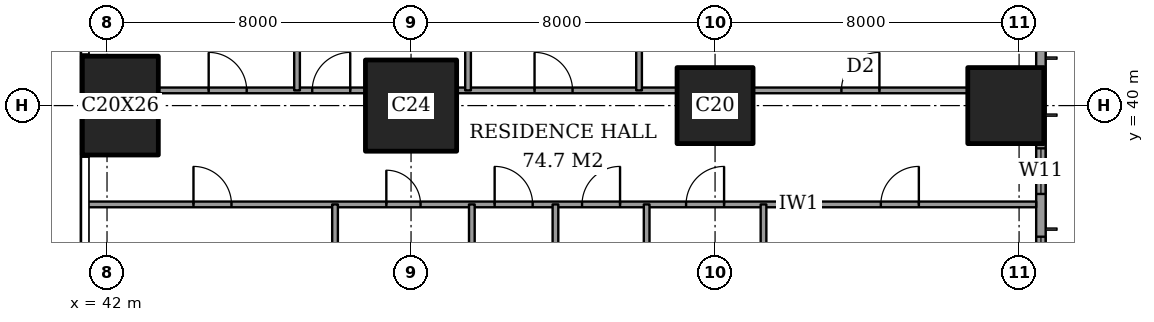
"""IFC4 building model, lengths in metres.
Left out: names, types, materials, properties, quantities, classifications, styles, units other than length and angle.
Written with IfcOpenShell. Run it as: python <this file> out.ifc"""

import sys

from ifc_helpers import new_model, si_unit, direction, frame, frame_2d, origin, origin_2d, place, context, subcontext, project, spatial, rectangle, extrude, element, fill, save


model = new_model("IFC4")
c1 = context("Model", 3, precision=1e-05, world=origin(), true_north=direction((0.0, 1.0)))
c2 = subcontext(c1, "Body", "Model", "MODEL_VIEW")
j1 = project(units=[si_unit("LENGTHUNIT", "METRE"), si_unit("PLANEANGLEUNIT", "RADIAN")], contexts=[c1])
p1 = place(None, origin())
s1 = spatial("IfcSite", under=j1, at=p1, CompositionType="ELEMENT")
p2 = place(p1, origin())
s2 = spatial("IfcBuilding", under=s1, at=p2, CompositionType="ELEMENT")
p3 = place(p2, frame((0.0, 0.0, 125.0)))
s3 = spatial("IfcBuildingStorey", under=s2, at=p3, CompositionType="ELEMENT", Elevation=125.0)
p4 = place(p3, frame((42.35, 40.0, 0.0), z_axis=(0.0, 0.0, 1.0), x_axis=(1.0, 0.0, 0.0)))
e1 = element("IfcColumn", 1, at=p4, inside=s3, PredefinedType="COLUMN", context=c2, shape_type="SweptSolid", body=[
    extrude(rectangle(XDim=2.0, YDim=2.6, at=origin_2d()), origin(), (0.0, 0.0, 1.0), 3.6),
])
p5 = place(p3, frame((50.0, 40.0, 0.0), z_axis=(0.0, 0.0, 1.0), x_axis=(1.0, 0.0, 0.0)))
e2 = element("IfcColumn", 2, at=p5, inside=s3, PredefinedType="COLUMN", context=c2, shape_type="SweptSolid", body=[
    extrude(rectangle(XDim=2.4, YDim=2.4, at=origin_2d()), origin(), (0.0, 0.0, 1.0), 3.6),
])
for number, where, z_axis, x_axis in (
    (3, (58.0, 40.0, 0.0), (0.0, 0.0, 1.0), (1.0, 0.0, 0.0)),
    (4, (65.65, 40.0, 0.0), (0.0, 0.0, 1.0), (1.0, 0.0, 0.0)),
):
    element("IfcColumn", number, at=place(p3, frame(where, z_axis=z_axis, x_axis=x_axis)), inside=s3, PredefinedType="COLUMN", context=c2, shape_type="SweptSolid", body=[
        extrude(rectangle(XDim=2.0, YDim=2.0, at=origin_2d()), origin(), (0.0, 0.0, 1.0), 3.6),
    ])
p6 = place(p3, frame((66.575, 3.175, 0.0), z_axis=(0.0, 0.0, 1.0), x_axis=(0.0, 1.0, 0.0)))
e5 = element("IfcWall", 5, at=p6, inside=s3, PredefinedType="SOLIDWALL", context=c2, shape_type="SweptSolid", body=[
    extrude(rectangle(XDim=41.65, YDim=0.25, at=frame_2d((20.825, 0.0))), origin(), (0.0, 0.0, 1.0), 3.6),
])
p7 = place(p6, frame((0.775, 0.0, 0.4)))
e6 = element("IfcOpeningElement", 6, at=p7, cuts=e5, PredefinedType="OPENING", context=c2, shape_type="SweptSolid", body=[
    extrude(rectangle(XDim=2.4, YDim=2.2, at=frame_2d((1.2, 1.1))), frame((0.0, 0.135, 0.0), z_axis=(0.0, -1.0, 0.0), x_axis=(1.0, 0.0, 0.0)), (0.0, 0.0, 1.0), 0.27),
])
p8 = place(p6, frame((6.125, 0.0, 0.4)))
e7 = element("IfcOpeningElement", 7, at=p8, cuts=e5, PredefinedType="OPENING", context=c2, shape_type="SweptSolid", body=[
    extrude(rectangle(XDim=1.2, YDim=2.2, at=frame_2d((0.6, 1.1))), frame((0.0, 0.135, 0.0), z_axis=(0.0, -1.0, 0.0), x_axis=(1.0, 0.0, 0.0)), (0.0, 0.0, 1.0), 0.27),
])
p9 = place(p6, frame((8.375, 0.0, 0.4)))
e8 = element("IfcOpeningElement", 8, at=p9, cuts=e5, PredefinedType="OPENING", context=c2, shape_type="SweptSolid", body=[
    extrude(rectangle(XDim=2.4, YDim=2.2, at=frame_2d((1.2, 1.1))), frame((0.0, 0.135, 0.0), z_axis=(0.0, -1.0, 0.0), x_axis=(1.0, 0.0, 0.0)), (0.0, 0.0, 1.0), 0.27),
])
p10 = place(p6, frame((15.775, 0.0, 0.4)))
e9 = element("IfcOpeningElement", 9, at=p10, cuts=e5, PredefinedType="OPENING", context=c2, shape_type="SweptSolid", body=[
    extrude(rectangle(XDim=2.4, YDim=2.2, at=frame_2d((1.2, 1.1))), frame((0.0, 0.135, 0.0), z_axis=(0.0, -1.0, 0.0), x_axis=(1.0, 0.0, 0.0)), (0.0, 0.0, 1.0), 0.27),
])
p11 = place(p6, frame((23.475, 0.0, 0.4)))
e10 = element("IfcOpeningElement", 10, at=p11, cuts=e5, PredefinedType="OPENING", context=c2, shape_type="SweptSolid", body=[
    extrude(rectangle(XDim=2.4, YDim=2.2, at=frame_2d((1.2, 1.1))), frame((0.0, 0.135, 0.0), z_axis=(0.0, -1.0, 0.0), x_axis=(1.0, 0.0, 0.0)), (0.0, 0.0, 1.0), 0.27),
])
p12 = place(p6, frame((30.975, 0.0, 0.4)))
e11 = element("IfcOpeningElement", 11, at=p12, cuts=e5, PredefinedType="OPENING", context=c2, shape_type="SweptSolid", body=[
    extrude(rectangle(XDim=2.4, YDim=2.2, at=frame_2d((1.2, 1.1))), frame((0.0, 0.135, 0.0), z_axis=(0.0, -1.0, 0.0), x_axis=(1.0, 0.0, 0.0)), (0.0, 0.0, 1.0), 0.27),
])
p13 = place(p6, frame((34.5, 0.0, 0.4)))
e12 = element("IfcOpeningElement", 12, at=p13, cuts=e5, PredefinedType="OPENING", context=c2, shape_type="SweptSolid", body=[
    extrude(rectangle(XDim=1.2, YDim=2.2, at=frame_2d((0.6, 1.1))), frame((0.0, 0.135, 0.0), z_axis=(0.0, -1.0, 0.0), x_axis=(1.0, 0.0, 0.0)), (0.0, 0.0, 1.0), 0.27),
])
p14 = place(p6, frame((38.475, 0.0, 0.4)))
e13 = element("IfcOpeningElement", 13, at=p14, cuts=e5, PredefinedType="OPENING", context=c2, shape_type="SweptSolid", body=[
    extrude(rectangle(XDim=2.4, YDim=2.2, at=frame_2d((1.2, 1.1))), frame((0.0, 0.135, 0.0), z_axis=(0.0, -1.0, 0.0), x_axis=(1.0, 0.0, 0.0)), (0.0, 0.0, 1.0), 0.27),
])
p15 = place(p3, frame((41.439, 37.4, 0.0), z_axis=(0.0, 0.0, 1.0), x_axis=(1.0, 0.0, 0.0)))
e14 = element("IfcWall", 14, at=p15, inside=s3, PredefinedType="PARTITIONING", context=c2, shape_type="SweptSolid", body=[
    extrude(rectangle(XDim=25.011, YDim=0.15, at=frame_2d((12.505, 0.0))), origin(), (0.0, 0.0, 1.0), 3.35),
])
p16 = place(p15, frame((10.761, 0.0, 0.0)))
e15 = element("IfcOpeningElement", 15, at=p16, cuts=e14, PredefinedType="OPENING", context=c2, shape_type="SweptSolid", body=[
    extrude(rectangle(XDim=1.0, YDim=2.1, at=frame_2d((0.5, 1.05))), frame((0.0, 0.085, 0.0), z_axis=(0.0, -1.0, 0.0), x_axis=(1.0, 0.0, 0.0)), (0.0, 0.0, 1.0), 0.17),
])
p17 = place(p15, frame((20.924, 0.0, 0.0)))
e16 = element("IfcOpeningElement", 16, at=p17, cuts=e14, PredefinedType="OPENING", context=c2, shape_type="SweptSolid", body=[
    extrude(rectangle(XDim=1.0, YDim=2.1, at=frame_2d((0.5, 1.05))), frame((0.0, 0.085, 0.0), z_axis=(0.0, -1.0, 0.0), x_axis=(1.0, 0.0, 0.0)), (0.0, 0.0, 1.0), 0.17),
])
p18 = place(p15, frame((15.799, 0.0, 0.0)))
e17 = element("IfcOpeningElement", 17, at=p18, cuts=e14, PredefinedType="OPENING", context=c2, shape_type="SweptSolid", body=[
    extrude(rectangle(XDim=1.0, YDim=2.1, at=frame_2d((0.5, 1.05))), frame((0.0, 0.085, 0.0), z_axis=(0.0, -1.0, 0.0), x_axis=(1.0, 0.0, 0.0)), (0.0, 0.0, 1.0), 0.17),
])
p19 = place(p15, frame((13.061, 0.0, 0.0)))
e18 = element("IfcOpeningElement", 18, at=p19, cuts=e14, PredefinedType="OPENING", context=c2, shape_type="SweptSolid", body=[
    extrude(rectangle(XDim=1.0, YDim=2.1, at=frame_2d((0.5, 1.05))), frame((0.0, 0.085, 0.0), z_axis=(0.0, -1.0, 0.0), x_axis=(1.0, 0.0, 0.0)), (0.0, 0.0, 1.0), 0.17),
])
p20 = place(p15, frame((7.911, 0.0, 0.0)))
e19 = element("IfcOpeningElement", 19, at=p20, cuts=e14, PredefinedType="OPENING", context=c2, shape_type="SweptSolid", body=[
    extrude(rectangle(XDim=0.9, YDim=2.1, at=frame_2d((0.45, 1.05))), frame((0.0, 0.085, 0.0), z_axis=(0.0, -1.0, 0.0), x_axis=(1.0, 0.0, 0.0)), (0.0, 0.0, 1.0), 0.17),
])
p21 = place(p15, frame((2.836, 0.0, 0.0)))
e20 = element("IfcOpeningElement", 20, at=p21, cuts=e14, PredefinedType="OPENING", context=c2, shape_type="SweptSolid", body=[
    extrude(rectangle(XDim=1.0, YDim=2.1, at=frame_2d((0.5, 1.05))), frame((0.0, 0.085, 0.0), z_axis=(0.0, -1.0, 0.0), x_axis=(1.0, 0.0, 0.0)), (0.0, 0.0, 1.0), 0.17),
])
p22 = place(p3, frame((43.35, 40.4, 0.0), z_axis=(0.0, 0.0, 1.0), x_axis=(1.0, 0.0, 0.0)))
e21 = element("IfcWall", 21, at=p22, inside=s3, PredefinedType="PARTITIONING", context=c2, shape_type="SweptSolid", body=[
    extrude(rectangle(XDim=5.45, YDim=0.15, at=frame_2d((2.725, 0.0))), origin(), (0.0, 0.0, 1.0), 3.35),
])
p23 = place(p22, frame((4.05, 0.0, 0.0)))
e22 = element("IfcOpeningElement", 22, at=p23, cuts=e21, PredefinedType="OPENING", context=c2, shape_type="SweptSolid", body=[
    extrude(rectangle(XDim=1.0, YDim=2.1, at=frame_2d((0.5, 1.05))), frame((0.0, 0.085, 0.0), z_axis=(0.0, -1.0, 0.0), x_axis=(1.0, 0.0, 0.0)), (0.0, 0.0, 1.0), 0.17),
])
p24 = place(p22, frame((1.325, 0.0, 0.0)))
e23 = element("IfcOpeningElement", 23, at=p24, cuts=e21, PredefinedType="OPENING", context=c2, shape_type="SweptSolid", body=[
    extrude(rectangle(XDim=1.0, YDim=2.1, at=frame_2d((0.5, 1.05))), frame((0.0, 0.085, 0.0), z_axis=(0.0, -1.0, 0.0), x_axis=(1.0, 0.0, 0.0)), (0.0, 0.0, 1.0), 0.17),
])
p25 = place(p3, frame((51.2, 40.4, 0.0), z_axis=(0.0, 0.0, 1.0), x_axis=(1.0, 0.0, 0.0)))
e24 = element("IfcWall", 24, at=p25, inside=s3, PredefinedType="PARTITIONING", context=c2, shape_type="SweptSolid", body=[
    extrude(rectangle(XDim=5.8, YDim=0.15, at=frame_2d((2.9, 0.0))), origin(), (0.0, 0.0, 1.0), 3.35),
])
p26 = place(p25, frame((2.05, 0.0, 0.0)))
e25 = element("IfcOpeningElement", 25, at=p26, cuts=e24, PredefinedType="OPENING", context=c2, shape_type="SweptSolid", body=[
    extrude(rectangle(XDim=1.0, YDim=2.1, at=frame_2d((0.5, 1.05))), frame((0.0, 0.085, 0.0), z_axis=(0.0, -1.0, 0.0), x_axis=(1.0, 0.0, 0.0)), (0.0, 0.0, 1.0), 0.17),
])
p27 = place(p3, frame((59.0, 40.4, 0.0), z_axis=(0.0, 0.0, 1.0), x_axis=(1.0, 0.0, 0.0)))
e26 = element("IfcWall", 26, at=p27, inside=s3, PredefinedType="PARTITIONING", context=c2, shape_type="SweptSolid", body=[
    extrude(rectangle(XDim=5.65, YDim=0.15, at=frame_2d((2.825, 0.0))), origin(), (0.0, 0.0, 1.0), 3.35),
])
p28 = place(p27, frame((2.325, 0.0, 0.0)))
e27 = element("IfcOpeningElement", 27, at=p28, cuts=e26, PredefinedType="OPENING", context=c2, shape_type="SweptSolid", body=[
    extrude(rectangle(XDim=1.0, YDim=2.1, at=frame_2d((0.5, 1.05))), frame((0.0, 0.085, 0.0), z_axis=(0.0, -1.0, 0.0), x_axis=(1.0, 0.0, 0.0)), (0.0, 0.0, 1.0), 0.17),
])
p29 = place(p3, frame((47.0, 40.4, 0.0), z_axis=(0.0, 0.0, 1.0), x_axis=(0.0, 1.0, 0.0)))
e28 = element("IfcWall", 28, at=p29, inside=s3, PredefinedType="PARTITIONING", context=c2, shape_type="SweptSolid", body=[
    extrude(rectangle(XDim=8.05, YDim=0.15, at=frame_2d((4.025, 0.0))), origin(), (0.0, 0.0, 1.0), 3.35),
])
p30 = place(p3, frame((48.0, 28.0, 0.0), z_axis=(0.0, 0.0, 1.0), x_axis=(0.0, 1.0, 0.0)))
e29 = element("IfcWall", 29, at=p30, inside=s3, PredefinedType="PARTITIONING", context=c2, shape_type="SweptSolid", body=[
    extrude(rectangle(XDim=9.4, YDim=0.15, at=frame_2d((4.7, 0.0))), origin(), (0.0, 0.0, 1.0), 3.35),
])
p31 = place(p30, frame((0.325, 0.0, 0.0)))
e30 = element("IfcOpeningElement", 30, at=p31, cuts=e29, PredefinedType="OPENING", context=c2, shape_type="SweptSolid", body=[
    extrude(rectangle(XDim=0.9, YDim=2.1, at=frame_2d((0.45, 1.05))), frame((0.0, 0.085, 0.0), z_axis=(0.0, -1.0, 0.0), x_axis=(1.0, 0.0, 0.0)), (0.0, 0.0, 1.0), 0.17),
])
p32 = place(p3, frame((51.5, 40.4, 0.0), z_axis=(0.0, 0.0, 1.0), x_axis=(0.0, 1.0, 0.0)))
e31 = element("IfcWall", 31, at=p32, inside=s3, PredefinedType="PARTITIONING", context=c2, shape_type="SweptSolid", body=[
    extrude(rectangle(XDim=8.05, YDim=0.15, at=frame_2d((4.025, 0.0))), origin(), (0.0, 0.0, 1.0), 3.35),
])
for number, where, z_axis, x_axis in (
    (32, (51.6, 29.55, 0.0), (0.0, 0.0, 1.0), (0.0, 1.0, 0.0)),
    (33, (53.8, 29.55, 0.0), (0.0, 0.0, 1.0), (0.0, 1.0, 0.0)),
):
    element("IfcWall", number, at=place(p3, frame(where, z_axis=z_axis, x_axis=x_axis)), inside=s3, PredefinedType="PARTITIONING", context=c2, shape_type="SweptSolid", body=[
        extrude(rectangle(XDim=7.85, YDim=0.15, at=frame_2d((3.925, 0.0))), origin(), (0.0, 0.0, 1.0), 3.35),
    ])
p33 = place(p3, frame((56.0, 40.4, 0.0), z_axis=(0.0, 0.0, 1.0), x_axis=(0.0, 1.0, 0.0)))
e34 = element("IfcWall", 34, at=p33, inside=s3, PredefinedType="PARTITIONING", context=c2, shape_type="SweptSolid", body=[
    extrude(rectangle(XDim=8.05, YDim=0.15, at=frame_2d((4.025, 0.0))), origin(), (0.0, 0.0, 1.0), 3.35),
])
p34 = place(p3, frame((56.2, 28.0, 0.0), z_axis=(0.0, 0.0, 1.0), x_axis=(0.0, 1.0, 0.0)))
e35 = element("IfcWall", 35, at=p34, inside=s3, PredefinedType="PARTITIONING", context=c2, shape_type="SweptSolid", body=[
    extrude(rectangle(XDim=9.4, YDim=0.15, at=frame_2d((4.7, 0.0))), origin(), (0.0, 0.0, 1.0), 3.35),
])
p35 = place(p34, frame((0.325, 0.0, 0.0)))
e36 = element("IfcOpeningElement", 36, at=p35, cuts=e35, PredefinedType="OPENING", context=c2, shape_type="SweptSolid", body=[
    extrude(rectangle(XDim=0.9, YDim=2.1, at=frame_2d((0.45, 1.05))), frame((0.0, 0.085, 0.0), z_axis=(0.0, -1.0, 0.0), x_axis=(1.0, 0.0, 0.0)), (0.0, 0.0, 1.0), 0.17),
])
p36 = place(p3, frame((59.275, 33.2, 0.0), z_axis=(0.0, 0.0, 1.0), x_axis=(0.0, 1.0, 0.0)))
e37 = element("IfcWall", 37, at=p36, inside=s3, PredefinedType="PARTITIONING", context=c2, shape_type="SweptSolid", body=[
    extrude(rectangle(XDim=4.2, YDim=0.15, at=frame_2d((2.1, 0.0))), origin(), (0.0, 0.0, 1.0), 3.35),
])
p37 = place(p12, origin())
e38 = element("IfcWindow", 38, at=p37, inside=s3, PartitioningType="SINGLE_PANEL", PredefinedType="WINDOW", context=c2, shape_type="SweptSolid", body=[
    extrude(rectangle(XDim=2.4, YDim=2.2, at=frame_2d((1.2, 1.1))), frame((0.0, 0.03, 0.0), z_axis=(0.0, -1.0, 0.0), x_axis=(1.0, 0.0, 0.0)), (0.0, 0.0, 1.0), 0.06),
])
fill(e11, e38)
p38 = place(p13, origin())
e39 = element("IfcWindow", 39, at=p38, inside=s3, PartitioningType="SINGLE_PANEL", PredefinedType="WINDOW", context=c2, shape_type="SweptSolid", body=[
    extrude(rectangle(XDim=1.2, YDim=2.2, at=frame_2d((0.6, 1.1))), frame((0.0, 0.03, 0.0), z_axis=(0.0, -1.0, 0.0), x_axis=(1.0, 0.0, 0.0)), (0.0, 0.0, 1.0), 0.06),
])
fill(e12, e39)
p39 = place(p28, origin())
e40 = element("IfcDoor", 40, at=p39, inside=s3, OperationType="SINGLE_SWING_LEFT", PredefinedType="DOOR", context=c2, shape_type="SweptSolid", body=[
    extrude(rectangle(XDim=1.0, YDim=2.1, at=frame_2d((0.5, 1.05))), frame((0.0, 0.025, 0.0), z_axis=(0.0, -1.0, 0.0), x_axis=(1.0, 0.0, 0.0)), (0.0, 0.0, 1.0), 0.05),
])
fill(e27, e40)
p40 = place(p26, origin())
e41 = element("IfcDoor", 41, at=p40, inside=s3, OperationType="SINGLE_SWING_RIGHT", PredefinedType="DOOR", context=c2, shape_type="SweptSolid", body=[
    extrude(rectangle(XDim=1.0, YDim=2.1, at=frame_2d((0.5, 1.05))), frame((0.0, 0.025, 0.0), z_axis=(0.0, -1.0, 0.0), x_axis=(1.0, 0.0, 0.0)), (0.0, 0.0, 1.0), 0.05),
])
fill(e25, e41)
p41 = place(p23, origin())
e42 = element("IfcDoor", 42, at=p41, inside=s3, OperationType="SINGLE_SWING_LEFT", PredefinedType="DOOR", context=c2, shape_type="SweptSolid", body=[
    extrude(rectangle(XDim=1.0, YDim=2.1, at=frame_2d((0.5, 1.05))), frame((0.0, 0.025, 0.0), z_axis=(0.0, -1.0, 0.0), x_axis=(1.0, 0.0, 0.0)), (0.0, 0.0, 1.0), 0.05),
])
fill(e22, e42)
p42 = place(p24, origin())
e43 = element("IfcDoor", 43, at=p42, inside=s3, OperationType="SINGLE_SWING_RIGHT", PredefinedType="DOOR", context=c2, shape_type="SweptSolid", body=[
    extrude(rectangle(XDim=1.0, YDim=2.1, at=frame_2d((0.5, 1.05))), frame((0.0, 0.025, 0.0), z_axis=(0.0, -1.0, 0.0), x_axis=(1.0, 0.0, 0.0)), (0.0, 0.0, 1.0), 0.05),
])
fill(e23, e43)
p43 = place(p16, origin())
e44 = element("IfcDoor", 44, at=p43, inside=s3, OperationType="SINGLE_SWING_RIGHT", PredefinedType="DOOR", context=c2, shape_type="SweptSolid", body=[
    extrude(rectangle(XDim=1.0, YDim=2.1, at=frame_2d((0.5, 1.05))), frame((0.0, 0.025, 0.0), z_axis=(0.0, -1.0, 0.0), x_axis=(1.0, 0.0, 0.0)), (0.0, 0.0, 1.0), 0.05),
])
fill(e15, e44)
p44 = place(p17, origin())
e45 = element("IfcDoor", 45, at=p44, inside=s3, OperationType="SINGLE_SWING_LEFT", PredefinedType="DOOR", context=c2, shape_type="SweptSolid", body=[
    extrude(rectangle(XDim=1.0, YDim=2.1, at=frame_2d((0.5, 1.05))), frame((0.0, 0.025, 0.0), z_axis=(0.0, -1.0, 0.0), x_axis=(1.0, 0.0, 0.0)), (0.0, 0.0, 1.0), 0.05),
])
fill(e16, e45)
p45 = place(p18, origin())
e46 = element("IfcDoor", 46, at=p45, inside=s3, OperationType="SINGLE_SWING_LEFT", PredefinedType="DOOR", context=c2, shape_type="SweptSolid", body=[
    extrude(rectangle(XDim=1.0, YDim=2.1, at=frame_2d((0.5, 1.05))), frame((0.0, 0.025, 0.0), z_axis=(0.0, -1.0, 0.0), x_axis=(1.0, 0.0, 0.0)), (0.0, 0.0, 1.0), 0.05),
])
fill(e17, e46)
p46 = place(p19, origin())
e47 = element("IfcDoor", 47, at=p46, inside=s3, OperationType="SINGLE_SWING_LEFT", PredefinedType="DOOR", context=c2, shape_type="SweptSolid", body=[
    extrude(rectangle(XDim=1.0, YDim=2.1, at=frame_2d((0.5, 1.05))), frame((0.0, 0.025, 0.0), z_axis=(0.0, -1.0, 0.0), x_axis=(1.0, 0.0, 0.0)), (0.0, 0.0, 1.0), 0.05),
])
fill(e18, e47)
p47 = place(p20, origin())
e48 = element("IfcDoor", 48, at=p47, inside=s3, OperationType="SINGLE_SWING_RIGHT", PredefinedType="DOOR", context=c2, shape_type="SweptSolid", body=[
    extrude(rectangle(XDim=0.9, YDim=2.1, at=frame_2d((0.45, 1.05))), frame((0.0, 0.025, 0.0), z_axis=(0.0, -1.0, 0.0), x_axis=(1.0, 0.0, 0.0)), (0.0, 0.0, 1.0), 0.05),
])
fill(e19, e48)
p48 = place(p21, origin())
e49 = element("IfcDoor", 49, at=p48, inside=s3, OperationType="SINGLE_SWING_RIGHT", PredefinedType="DOOR", context=c2, shape_type="SweptSolid", body=[
    extrude(rectangle(XDim=1.0, YDim=2.1, at=frame_2d((0.5, 1.05))), frame((0.0, 0.025, 0.0), z_axis=(0.0, -1.0, 0.0), x_axis=(1.0, 0.0, 0.0)), (0.0, 0.0, 1.0), 0.05),
])
fill(e20, e49)
save(model, sys.argv[1])
